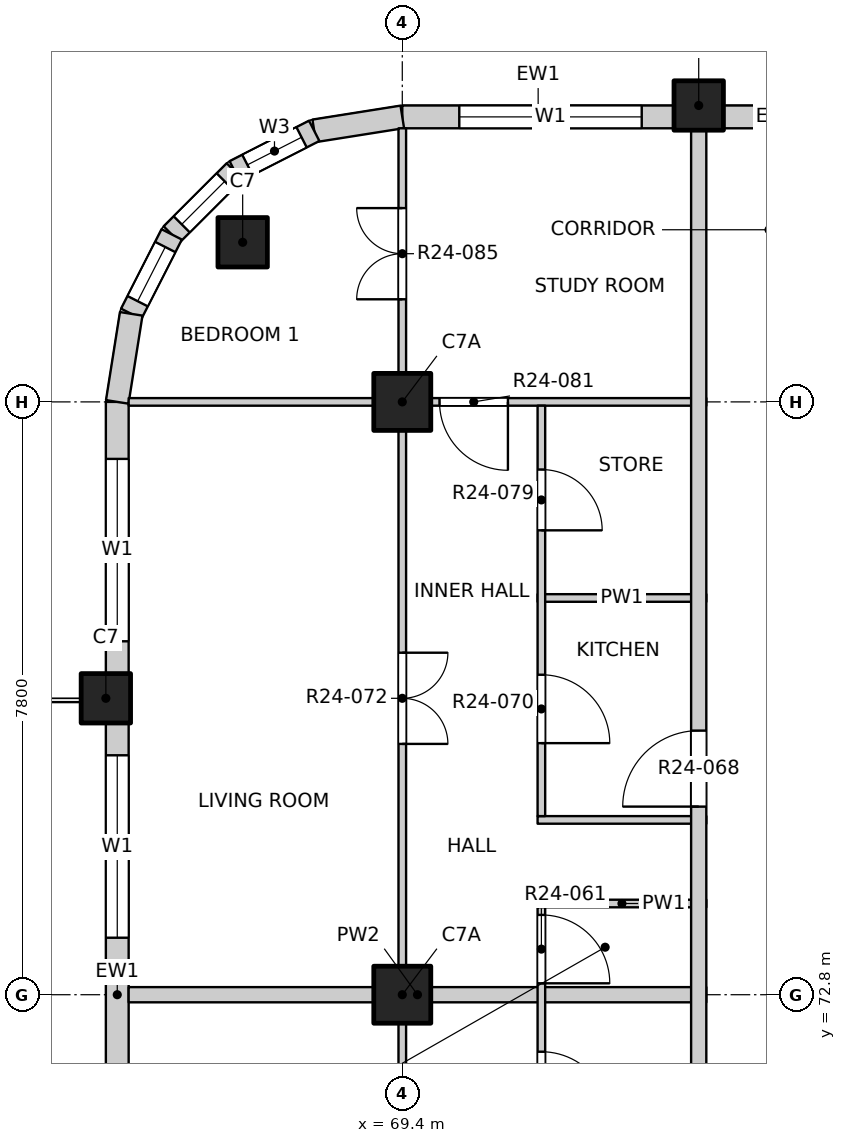
"""IFC4 building model, lengths in metres.
Left out: names, types, materials, properties, quantities, classifications, styles, units other than length and angle.
Written with IfcOpenShell. Run it as: python <this file> out.ifc"""

import sys

from ifc_helpers import new_model, si_unit, direction, frame, frame_2d, origin, origin_2d, place, context, subcontext, project, spatial, rectangle, extrude, element, fill, save


model = new_model("IFC4")
c1 = context("Model", 3, precision=1e-05, world=origin(), true_north=direction((0.0, 1.0)))
c2 = subcontext(c1, "Body", "Model", "MODEL_VIEW")
j1 = project(units=[si_unit("LENGTHUNIT", "METRE"), si_unit("PLANEANGLEUNIT", "RADIAN")], contexts=[c1])
p1 = place(None, origin())
s1 = spatial("IfcSite", under=j1, at=p1, CompositionType="ELEMENT")
p2 = place(p1, origin())
s2 = spatial("IfcBuilding", under=s1, at=p2, CompositionType="ELEMENT")
p3 = place(p2, frame((0.0, 0.0, 249.4)))
s3 = spatial("IfcBuildingStorey", under=s2, at=p3, CompositionType="ELEMENT", Elevation=249.4)
for number, where, z_axis, x_axis in (
    (1, (67.3, 82.7, -0.25), (0.0, 0.0, 1.0), (1.0, 0.0, 0.0)),
    (2, (73.3, 84.5, -0.25), (0.0, 0.0, 1.0), (1.0, 0.0, 0.0)),
    (3, (65.5, 76.7, -0.25), (0.0, 0.0, 1.0), (1.0, 0.0, 0.0)),
):
    element("IfcColumn", number, at=place(p3, frame(where, z_axis=z_axis, x_axis=x_axis)), inside=s3, PredefinedType="COLUMN", context=c2, shape_type="SweptSolid", body=[
        extrude(rectangle(XDim=0.65, YDim=0.65, at=origin_2d()), origin(), (0.0, 0.0, 1.0), 3.4),
    ])
for number, where, z_axis, x_axis in (
    (4, (69.4, 72.8, -0.25), (0.0, 0.0, 1.0), (1.0, 0.0, 0.0)),
    (5, (69.4, 80.6, -0.25), (0.0, 0.0, 1.0), (1.0, 0.0, 0.0)),
):
    element("IfcColumn", number, at=place(p3, frame(where, z_axis=z_axis, x_axis=x_axis)), inside=s3, PredefinedType="COLUMN", context=c2, shape_type="SweptSolid", body=[
        extrude(rectangle(XDim=0.75, YDim=0.75, at=origin_2d()), origin(), (0.0, 0.0, 1.0), 3.4),
    ])
p4 = place(p3, frame((69.4, 84.35, 0.0), z_axis=(0.0, 0.0, 1.0), x_axis=(1.0, 0.0, 0.0)))
e6 = element("IfcWall", 6, at=p4, inside=s3, PredefinedType="SOLIDWALL", context=c2, shape_type="SweptSolid", body=[
    extrude(rectangle(XDim=3.575, YDim=0.3, at=frame_2d((1.788, 0.0))), origin(), (0.0, 0.0, 1.0), 2.7),
])
p5 = place(p4, frame((0.75, 0.0, 0.9)))
e7 = element("IfcOpeningElement", 7, at=p5, cuts=e6, PredefinedType="OPENING", context=c2, shape_type="SweptSolid", body=[
    extrude(rectangle(XDim=2.4, YDim=1.8, at=frame_2d((1.2, 0.9))), frame((0.0, 0.16, 0.0), z_axis=(0.0, -1.0, 0.0), x_axis=(1.0, 0.0, 0.0)), (0.0, 0.0, 1.0), 0.32),
])
p6 = place(p3, frame((73.625, 84.35, 0.0), z_axis=(0.0, 0.0, 1.0), x_axis=(1.0, 0.0, 0.0)))
e8 = element("IfcWall", 8, at=p6, inside=s3, PredefinedType="SOLIDWALL", context=c2, shape_type="SweptSolid", body=[
    extrude(rectangle(XDim=1.425, YDim=0.3, at=frame_2d((0.712, 0.0))), origin(), (0.0, 0.0, 1.0), 2.7),
])
p7 = place(p3, frame((65.65, 69.225, 0.0), z_axis=(0.0, 0.0, 1.0), x_axis=(0.0, 1.0, 0.0)))
e9 = element("IfcWall", 9, at=p7, inside=s3, PredefinedType="SOLIDWALL", context=c2, shape_type="SweptSolid", body=[
    extrude(rectangle(XDim=7.15, YDim=0.3, at=frame_2d((3.575, 0.0))), origin(), (0.0, 0.0, 1.0), 2.7),
])
p8 = place(p7, frame((0.725, 0.0, 0.0)))
e10 = element("IfcOpeningElement", 10, at=p8, cuts=e9, PredefinedType="OPENING", context=c2, shape_type="SweptSolid", body=[
    extrude(rectangle(XDim=1.8, YDim=2.4, at=frame_2d((0.9, 1.2))), frame((0.0, 0.16, 0.0), z_axis=(0.0, -1.0, 0.0), x_axis=(1.0, 0.0, 0.0)), (0.0, 0.0, 1.0), 0.32),
])
p9 = place(p7, frame((4.325, 0.0, 0.9)))
e11 = element("IfcOpeningElement", 11, at=p9, cuts=e9, PredefinedType="OPENING", context=c2, shape_type="SweptSolid", body=[
    extrude(rectangle(XDim=2.4, YDim=1.8, at=frame_2d((1.2, 0.9))), frame((0.0, 0.16, 0.0), z_axis=(0.0, -1.0, 0.0), x_axis=(1.0, 0.0, 0.0)), (0.0, 0.0, 1.0), 0.32),
])
p10 = place(p3, frame((65.65, 77.025, 0.0), z_axis=(0.0, 0.0, 1.0), x_axis=(0.0, 1.0, 0.0)))
e12 = element("IfcWall", 12, at=p10, inside=s3, PredefinedType="SOLIDWALL", context=c2, shape_type="SweptSolid", body=[
    extrude(rectangle(XDim=3.575, YDim=0.3, at=frame_2d((1.788, 0.0))), origin(), (0.0, 0.0, 1.0), 2.7),
])
p11 = place(p10, frame((0.425, 0.0, 0.9)))
e13 = element("IfcOpeningElement", 13, at=p11, cuts=e12, PredefinedType="OPENING", context=c2, shape_type="SweptSolid", body=[
    extrude(rectangle(XDim=2.4, YDim=1.8, at=frame_2d((1.2, 0.9))), frame((0.0, 0.16, 0.0), z_axis=(0.0, -1.0, 0.0), x_axis=(1.0, 0.0, 0.0)), (0.0, 0.0, 1.0), 0.32),
])
p12 = place(p3, frame((69.4, 84.35, 0.0), z_axis=(0.0, 0.0, 1.0), x_axis=(-0.987678452879, -0.156496880861, 0.0)))
e14 = element("IfcWall", 14, at=p12, inside=s3, PredefinedType="SOLIDWALL", context=c2, shape_type="SweptSolid", body=[
    extrude(rectangle(XDim=1.173, YDim=0.3, at=frame_2d((0.586, 0.0))), origin(), (0.0, 0.0, 1.0), 2.7),
])
p13 = place(p3, frame((68.241, 84.167, 0.0), z_axis=(0.0, 0.0, 1.0), x_axis=(-0.890988677504, -0.454025524128, 0.0)))
e15 = element("IfcWall", 15, at=p13, inside=s3, PredefinedType="SOLIDWALL", context=c2, shape_type="SweptSolid", body=[
    extrude(rectangle(XDim=1.173, YDim=0.3, at=frame_2d((0.587, 0.0))), origin(), (0.0, 0.0, 1.0), 2.7),
])
p14 = place(p13, frame((0.187, 0.0, 0.9)))
e16 = element("IfcOpeningElement", 16, at=p14, cuts=e15, PredefinedType="OPENING", context=c2, shape_type="SweptSolid", body=[
    extrude(rectangle(XDim=0.8, YDim=1.2, at=frame_2d((0.4, 0.6))), frame((0.0, 0.16, 0.0), z_axis=(0.0, -1.0, 0.0), x_axis=(1.0, 0.0, 0.0)), (0.0, 0.0, 1.0), 0.32),
])
p15 = place(p3, frame((67.196, 83.634, 0.0), z_axis=(0.0, 0.0, 1.0), x_axis=(-0.707106781187, -0.707106781187, 0.0)))
e17 = element("IfcWall", 17, at=p15, inside=s3, PredefinedType="SOLIDWALL", context=c2, shape_type="SweptSolid", body=[
    extrude(rectangle(XDim=1.173, YDim=0.3, at=frame_2d((0.586, 0.0))), origin(), (0.0, 0.0, 1.0), 2.7),
])
p16 = place(p15, frame((0.187, 0.0, 0.9)))
e18 = element("IfcOpeningElement", 18, at=p16, cuts=e17, PredefinedType="OPENING", context=c2, shape_type="SweptSolid", body=[
    extrude(rectangle(XDim=0.8, YDim=1.2, at=frame_2d((0.4, 0.6))), frame((0.0, 0.16, 0.0), z_axis=(0.0, -1.0, 0.0), x_axis=(1.0, 0.0, 0.0)), (0.0, 0.0, 1.0), 0.32),
])
p17 = place(p3, frame((66.366, 82.804, 0.0), z_axis=(0.0, 0.0, 1.0), x_axis=(-0.454025524128, -0.890988677504, 0.0)))
e19 = element("IfcWall", 19, at=p17, inside=s3, PredefinedType="SOLIDWALL", context=c2, shape_type="SweptSolid", body=[
    extrude(rectangle(XDim=1.173, YDim=0.3, at=frame_2d((0.587, 0.0))), origin(), (0.0, 0.0, 1.0), 2.7),
])
p18 = place(p17, frame((0.187, 0.0, 0.9)))
e20 = element("IfcOpeningElement", 20, at=p18, cuts=e19, PredefinedType="OPENING", context=c2, shape_type="SweptSolid", body=[
    extrude(rectangle(XDim=0.8, YDim=1.2, at=frame_2d((0.4, 0.6))), frame((0.0, 0.16, 0.0), z_axis=(0.0, -1.0, 0.0), x_axis=(1.0, 0.0, 0.0)), (0.0, 0.0, 1.0), 0.32),
])
p19 = place(p3, frame((65.833, 81.759, 0.0), z_axis=(0.0, 0.0, 1.0), x_axis=(-0.156496880861, -0.987678452879, 0.0)))
e21 = element("IfcWall", 21, at=p19, inside=s3, PredefinedType="SOLIDWALL", context=c2, shape_type="SweptSolid", body=[
    extrude(rectangle(XDim=1.173, YDim=0.3, at=frame_2d((0.586, 0.0))), origin(), (0.0, 0.0, 1.0), 2.7),
])
p20 = place(p3, frame((65.8, 72.8, 0.0), z_axis=(0.0, 0.0, 1.0), x_axis=(1.0, 0.0, 0.0)))
e22 = element("IfcWall", 22, at=p20, inside=s3, PredefinedType="PARTITIONING", context=c2, shape_type="SweptSolid", body=[
    extrude(rectangle(XDim=7.6, YDim=0.2, at=frame_2d((3.8, 0.0))), origin(), (0.0, 0.0, 1.0), 3.15),
])
for number, where, z_axis, x_axis in (
    (23, (71.18, 74.0, 0.0), (0.0, 0.0, 1.0), (1.0, 0.0, 0.0)),
    (24, (71.18, 75.1, 0.0), (0.0, 0.0, 1.0), (1.0, 0.0, 0.0)),
    (25, (71.18, 78.02, 0.0), (0.0, 0.0, 1.0), (1.0, 0.0, 0.0)),
):
    element("IfcWall", number, at=place(p3, frame(where, z_axis=z_axis, x_axis=x_axis)), inside=s3, PredefinedType="PARTITIONING", context=c2, shape_type="SweptSolid", body=[
        extrude(rectangle(XDim=2.22, YDim=0.1, at=frame_2d((1.11, 0.0))), origin(), (0.0, 0.0, 1.0), 3.15),
    ])
p21 = place(p3, frame((65.8, 80.6, 0.0), z_axis=(0.0, 0.0, 1.0), x_axis=(1.0, 0.0, 0.0)))
e26 = element("IfcWall", 26, at=p21, inside=s3, PredefinedType="PARTITIONING", context=c2, shape_type="SweptSolid", body=[
    extrude(rectangle(XDim=7.6, YDim=0.1, at=frame_2d((3.8, 0.0))), origin(), (0.0, 0.0, 1.0), 3.15),
])
p22 = place(p21, frame((4.09, 0.0, 0.0)))
e27 = element("IfcOpeningElement", 27, at=p22, cuts=e26, PredefinedType="OPENING", context=c2, shape_type="SweptSolid", body=[
    extrude(rectangle(XDim=0.9, YDim=2.1, at=frame_2d((0.45, 1.05))), frame((0.0, 0.06, 0.0), z_axis=(0.0, -1.0, 0.0), x_axis=(1.0, 0.0, 0.0)), (0.0, 0.0, 1.0), 0.12),
])
p23 = place(p3, frame((69.4, 45.8, 0.0), z_axis=(0.0, 0.0, 1.0), x_axis=(0.0, 1.0, 0.0)))
e28 = element("IfcWall", 28, at=p23, inside=s3, PredefinedType="PARTITIONING", context=c2, shape_type="SweptSolid", body=[
    extrude(rectangle(XDim=38.4, YDim=0.1, at=frame_2d((19.2, 0.0))), origin(), (0.0, 0.0, 1.0), 3.15),
])
p24 = place(p23, frame((1.05, 0.0, 0.0)))
e29 = element("IfcOpeningElement", 29, at=p24, cuts=e28, PredefinedType="OPENING", context=c2, shape_type="SweptSolid", body=[
    extrude(rectangle(XDim=1.2, YDim=2.1, at=frame_2d((0.6, 1.05))), frame((0.0, 0.06, 0.0), z_axis=(0.0, -1.0, 0.0), x_axis=(1.0, 0.0, 0.0)), (0.0, 0.0, 1.0), 0.12),
])
p25 = place(p23, frame((5.1, 0.0, 0.0)))
e30 = element("IfcOpeningElement", 30, at=p25, cuts=e28, PredefinedType="OPENING", context=c2, shape_type="SweptSolid", body=[
    extrude(rectangle(XDim=0.9, YDim=2.1, at=frame_2d((0.45, 1.05))), frame((0.0, 0.06, 0.0), z_axis=(0.0, -1.0, 0.0), x_axis=(1.0, 0.0, 0.0)), (0.0, 0.0, 1.0), 0.12),
])
p26 = place(p23, frame((9.0, 0.0, 0.0)))
e31 = element("IfcOpeningElement", 31, at=p26, cuts=e28, PredefinedType="OPENING", context=c2, shape_type="SweptSolid", body=[
    extrude(rectangle(XDim=0.9, YDim=2.1, at=frame_2d((0.45, 1.05))), frame((0.0, 0.06, 0.0), z_axis=(0.0, -1.0, 0.0), x_axis=(1.0, 0.0, 0.0)), (0.0, 0.0, 1.0), 0.12),
])
p27 = place(p23, frame((12.9, 0.0, 0.0)))
e32 = element("IfcOpeningElement", 32, at=p27, cuts=e28, PredefinedType="OPENING", context=c2, shape_type="SweptSolid", body=[
    extrude(rectangle(XDim=0.9, YDim=2.1, at=frame_2d((0.45, 1.05))), frame((0.0, 0.06, 0.0), z_axis=(0.0, -1.0, 0.0), x_axis=(1.0, 0.0, 0.0)), (0.0, 0.0, 1.0), 0.12),
])
p28 = place(p23, frame((16.8, 0.0, 0.0)))
e33 = element("IfcOpeningElement", 33, at=p28, cuts=e28, PredefinedType="OPENING", context=c2, shape_type="SweptSolid", body=[
    extrude(rectangle(XDim=0.9, YDim=2.1, at=frame_2d((0.45, 1.05))), frame((0.0, 0.06, 0.0), z_axis=(0.0, -1.0, 0.0), x_axis=(1.0, 0.0, 0.0)), (0.0, 0.0, 1.0), 0.12),
])
p29 = place(p23, frame((20.7, 0.0, 0.0)))
e34 = element("IfcOpeningElement", 34, at=p29, cuts=e28, PredefinedType="OPENING", context=c2, shape_type="SweptSolid", body=[
    extrude(rectangle(XDim=0.9, YDim=2.1, at=frame_2d((0.45, 1.05))), frame((0.0, 0.06, 0.0), z_axis=(0.0, -1.0, 0.0), x_axis=(1.0, 0.0, 0.0)), (0.0, 0.0, 1.0), 0.12),
])
p30 = place(p23, frame((24.6, 0.0, 0.0)))
e35 = element("IfcOpeningElement", 35, at=p30, cuts=e28, PredefinedType="OPENING", context=c2, shape_type="SweptSolid", body=[
    extrude(rectangle(XDim=0.9, YDim=2.1, at=frame_2d((0.45, 1.05))), frame((0.0, 0.06, 0.0), z_axis=(0.0, -1.0, 0.0), x_axis=(1.0, 0.0, 0.0)), (0.0, 0.0, 1.0), 0.12),
])
p31 = place(p23, frame((30.3, 0.0, 0.0)))
e36 = element("IfcOpeningElement", 36, at=p31, cuts=e28, PredefinedType="OPENING", context=c2, shape_type="SweptSolid", body=[
    extrude(rectangle(XDim=1.2, YDim=2.1, at=frame_2d((0.6, 1.05))), frame((0.0, 0.06, 0.0), z_axis=(0.0, -1.0, 0.0), x_axis=(1.0, 0.0, 0.0)), (0.0, 0.0, 1.0), 0.12),
])
p32 = place(p23, frame((36.15, 0.0, 0.0)))
e37 = element("IfcOpeningElement", 37, at=p32, cuts=e28, PredefinedType="OPENING", context=c2, shape_type="SweptSolid", body=[
    extrude(rectangle(XDim=1.2, YDim=2.1, at=frame_2d((0.6, 1.05))), frame((0.0, 0.06, 0.0), z_axis=(0.0, -1.0, 0.0), x_axis=(1.0, 0.0, 0.0)), (0.0, 0.0, 1.0), 0.12),
])
p33 = place(p3, frame((71.23, 67.25, 0.0), z_axis=(0.0, 0.0, 1.0), x_axis=(0.0, 1.0, 0.0)))
e38 = element("IfcWall", 38, at=p33, inside=s3, PredefinedType="PARTITIONING", context=c2, shape_type="SweptSolid", body=[
    extrude(rectangle(XDim=6.7, YDim=0.1, at=frame_2d((3.35, 0.0))), origin(), (0.0, 0.0, 1.0), 3.15),
])
p34 = place(p33, frame((1.1, 0.0, 0.0)))
e39 = element("IfcOpeningElement", 39, at=p34, cuts=e38, PredefinedType="OPENING", context=c2, shape_type="SweptSolid", body=[
    extrude(rectangle(XDim=0.9, YDim=2.1, at=frame_2d((0.45, 1.05))), frame((0.0, 0.06, 0.0), z_axis=(0.0, -1.0, 0.0), x_axis=(1.0, 0.0, 0.0)), (0.0, 0.0, 1.0), 0.12),
])
p35 = place(p33, frame((3.9, 0.0, 0.0)))
e40 = element("IfcOpeningElement", 40, at=p35, cuts=e38, PredefinedType="OPENING", context=c2, shape_type="SweptSolid", body=[
    extrude(rectangle(XDim=0.9, YDim=2.1, at=frame_2d((0.45, 1.05))), frame((0.0, 0.06, 0.0), z_axis=(0.0, -1.0, 0.0), x_axis=(1.0, 0.0, 0.0)), (0.0, 0.0, 1.0), 0.12),
])
p36 = place(p33, frame((5.7, 0.0, 0.0)))
e41 = element("IfcOpeningElement", 41, at=p36, cuts=e38, PredefinedType="OPENING", context=c2, shape_type="SweptSolid", body=[
    extrude(rectangle(XDim=0.9, YDim=2.1, at=frame_2d((0.45, 1.05))), frame((0.0, 0.06, 0.0), z_axis=(0.0, -1.0, 0.0), x_axis=(1.0, 0.0, 0.0)), (0.0, 0.0, 1.0), 0.12),
])
p37 = place(p3, frame((71.23, 75.15, 0.0), z_axis=(0.0, 0.0, 1.0), x_axis=(0.0, 1.0, 0.0)))
e42 = element("IfcWall", 42, at=p37, inside=s3, PredefinedType="PARTITIONING", context=c2, shape_type="SweptSolid", body=[
    extrude(rectangle(XDim=5.4, YDim=0.1, at=frame_2d((2.7, 0.0))), origin(), (0.0, 0.0, 1.0), 3.15),
])
p38 = place(p37, frame((0.96, 0.0, 0.0)))
e43 = element("IfcOpeningElement", 43, at=p38, cuts=e42, PredefinedType="OPENING", context=c2, shape_type="SweptSolid", body=[
    extrude(rectangle(XDim=0.9, YDim=2.1, at=frame_2d((0.45, 1.05))), frame((0.0, 0.06, 0.0), z_axis=(0.0, -1.0, 0.0), x_axis=(1.0, 0.0, 0.0)), (0.0, 0.0, 1.0), 0.12),
])
p39 = place(p37, frame((3.76, 0.0, 0.0)))
e44 = element("IfcOpeningElement", 44, at=p39, cuts=e42, PredefinedType="OPENING", context=c2, shape_type="SweptSolid", body=[
    extrude(rectangle(XDim=0.8, YDim=2.1, at=frame_2d((0.4, 1.05))), frame((0.0, 0.06, 0.0), z_axis=(0.0, -1.0, 0.0), x_axis=(1.0, 0.0, 0.0)), (0.0, 0.0, 1.0), 0.12),
])
p40 = place(p3, frame((73.3, 49.5, 0.0), z_axis=(0.0, 0.0, 1.0), x_axis=(0.0, 1.0, 0.0)))
e45 = element("IfcWall", 45, at=p40, inside=s3, PredefinedType="PARTITIONING", context=c2, shape_type="SweptSolid", body=[
    extrude(rectangle(XDim=34.7, YDim=0.2, at=frame_2d((17.35, 0.0))), origin(), (0.0, 0.0, 1.0), 3.15),
])
p41 = place(p40, frame((3.325, 0.0, 0.0)))
e46 = element("IfcOpeningElement", 46, at=p41, cuts=e45, PredefinedType="OPENING", context=c2, shape_type="SweptSolid", body=[
    extrude(rectangle(XDim=1.0, YDim=2.1, at=frame_2d((0.5, 1.05))), frame((0.0, 0.11, 0.0), z_axis=(0.0, -1.0, 0.0), x_axis=(1.0, 0.0, 0.0)), (0.0, 0.0, 1.0), 0.22),
])
p42 = place(p40, frame((17.875, 0.0, 0.0)))
e47 = element("IfcOpeningElement", 47, at=p42, cuts=e45, PredefinedType="OPENING", context=c2, shape_type="SweptSolid", body=[
    extrude(rectangle(XDim=1.0, YDim=2.1, at=frame_2d((0.5, 1.05))), frame((0.0, 0.11, 0.0), z_axis=(0.0, -1.0, 0.0), x_axis=(1.0, 0.0, 0.0)), (0.0, 0.0, 1.0), 0.22),
])
p43 = place(p40, frame((25.775, 0.0, 0.0)))
e48 = element("IfcOpeningElement", 48, at=p43, cuts=e45, PredefinedType="OPENING", context=c2, shape_type="SweptSolid", body=[
    extrude(rectangle(XDim=1.0, YDim=2.1, at=frame_2d((0.5, 1.05))), frame((0.0, 0.11, 0.0), z_axis=(0.0, -1.0, 0.0), x_axis=(1.0, 0.0, 0.0)), (0.0, 0.0, 1.0), 0.22),
])
p44 = place(p5, origin())
e49 = element("IfcWindow", 49, at=p44, inside=s3, PartitioningType="DOUBLE_PANEL_VERTICAL", PredefinedType="WINDOW", context=c2, shape_type="SweptSolid", body=[
    extrude(rectangle(XDim=2.4, YDim=1.8, at=frame_2d((1.2, 0.9))), frame((0.0, 0.03, 0.0), z_axis=(0.0, -1.0, 0.0), x_axis=(1.0, 0.0, 0.0)), (0.0, 0.0, 1.0), 0.06),
])
fill(e7, e49)
p45 = place(p9, origin())
e50 = element("IfcWindow", 50, at=p45, inside=s3, PartitioningType="DOUBLE_PANEL_VERTICAL", PredefinedType="WINDOW", context=c2, shape_type="SweptSolid", body=[
    extrude(rectangle(XDim=2.4, YDim=1.8, at=frame_2d((1.2, 0.9))), frame((0.0, 0.03, 0.0), z_axis=(0.0, -1.0, 0.0), x_axis=(1.0, 0.0, 0.0)), (0.0, 0.0, 1.0), 0.06),
])
fill(e11, e50)
p46 = place(p11, origin())
e51 = element("IfcWindow", 51, at=p46, inside=s3, PartitioningType="DOUBLE_PANEL_VERTICAL", PredefinedType="WINDOW", context=c2, shape_type="SweptSolid", body=[
    extrude(rectangle(XDim=2.4, YDim=1.8, at=frame_2d((1.2, 0.9))), frame((0.0, 0.03, 0.0), z_axis=(0.0, -1.0, 0.0), x_axis=(1.0, 0.0, 0.0)), (0.0, 0.0, 1.0), 0.06),
])
fill(e13, e51)
p47 = place(p14, origin())
e52 = element("IfcWindow", 52, at=p47, inside=s3, PartitioningType="SINGLE_PANEL", PredefinedType="WINDOW", context=c2, shape_type="SweptSolid", body=[
    extrude(rectangle(XDim=0.8, YDim=1.2, at=frame_2d((0.4, 0.6))), frame((0.0, 0.03, 0.0), z_axis=(0.0, -1.0, 0.0), x_axis=(1.0, 0.0, 0.0)), (0.0, 0.0, 1.0), 0.06),
])
fill(e16, e52)
p48 = place(p16, origin())
e53 = element("IfcWindow", 53, at=p48, inside=s3, PartitioningType="SINGLE_PANEL", PredefinedType="WINDOW", context=c2, shape_type="SweptSolid", body=[
    extrude(rectangle(XDim=0.8, YDim=1.2, at=frame_2d((0.4, 0.6))), frame((0.0, 0.03, 0.0), z_axis=(0.0, -1.0, 0.0), x_axis=(1.0, 0.0, 0.0)), (0.0, 0.0, 1.0), 0.06),
])
fill(e18, e53)
p49 = place(p18, origin())
e54 = element("IfcWindow", 54, at=p49, inside=s3, PartitioningType="SINGLE_PANEL", PredefinedType="WINDOW", context=c2, shape_type="SweptSolid", body=[
    extrude(rectangle(XDim=0.8, YDim=1.2, at=frame_2d((0.4, 0.6))), frame((0.0, 0.03, 0.0), z_axis=(0.0, -1.0, 0.0), x_axis=(1.0, 0.0, 0.0)), (0.0, 0.0, 1.0), 0.06),
])
fill(e20, e54)
p50 = place(p35, origin())
e55 = element("IfcDoor", 55, at=p50, inside=s3, OperationType="SINGLE_SWING_RIGHT", PredefinedType="DOOR", context=c2, shape_type="SweptSolid", body=[
    extrude(rectangle(XDim=0.9, YDim=2.1, at=frame_2d((0.45, 1.05))), frame((0.0, 0.025, 0.0), z_axis=(0.0, -1.0, 0.0), x_axis=(1.0, 0.0, 0.0)), (0.0, 0.0, 1.0), 0.05),
])
fill(e40, e55)
p51 = place(p36, origin())
e56 = element("IfcDoor", 56, at=p51, inside=s3, OperationType="SINGLE_SWING_RIGHT", PredefinedType="DOOR", context=c2, shape_type="SweptSolid", body=[
    extrude(rectangle(XDim=0.9, YDim=2.1, at=frame_2d((0.45, 1.05))), frame((0.0, 0.025, 0.0), z_axis=(0.0, -1.0, 0.0), x_axis=(1.0, 0.0, 0.0)), (0.0, 0.0, 1.0), 0.05),
])
fill(e41, e56)
p52 = place(p43, origin())
e57 = element("IfcDoor", 57, at=p52, inside=s3, OperationType="SINGLE_SWING_RIGHT", PredefinedType="DOOR", context=c2, shape_type="SweptSolid", body=[
    extrude(rectangle(XDim=1.0, YDim=2.1, at=frame_2d((0.5, 1.05))), frame((0.0, 0.025, 0.0), z_axis=(0.0, -1.0, 0.0), x_axis=(1.0, 0.0, 0.0)), (0.0, 0.0, 1.0), 0.05),
])
fill(e48, e57)
p53 = place(p38, origin())
e58 = element("IfcDoor", 58, at=p53, inside=s3, OperationType="SINGLE_SWING_RIGHT", PredefinedType="DOOR", context=c2, shape_type="SweptSolid", body=[
    extrude(rectangle(XDim=0.9, YDim=2.1, at=frame_2d((0.45, 1.05))), frame((0.0, 0.025, 0.0), z_axis=(0.0, -1.0, 0.0), x_axis=(1.0, 0.0, 0.0)), (0.0, 0.0, 1.0), 0.05),
])
fill(e43, e58)
p54 = place(p31, origin())
e59 = element("IfcDoor", 59, at=p54, inside=s3, OperationType="DOUBLE_DOOR_SINGLE_SWING", PredefinedType="DOOR", context=c2, shape_type="SweptSolid", body=[
    extrude(rectangle(XDim=1.2, YDim=2.1, at=frame_2d((0.6, 1.05))), frame((0.0, 0.025, 0.0), z_axis=(0.0, -1.0, 0.0), x_axis=(1.0, 0.0, 0.0)), (0.0, 0.0, 1.0), 0.05),
])
fill(e36, e59)
p55 = place(p39, origin())
e60 = element("IfcDoor", 60, at=p55, inside=s3, OperationType="SINGLE_SWING_RIGHT", PredefinedType="DOOR", context=c2, shape_type="SweptSolid", body=[
    extrude(rectangle(XDim=0.8, YDim=2.1, at=frame_2d((0.4, 1.05))), frame((0.0, 0.025, 0.0), z_axis=(0.0, -1.0, 0.0), x_axis=(1.0, 0.0, 0.0)), (0.0, 0.0, 1.0), 0.05),
])
fill(e44, e60)
p56 = place(p22, origin())
e61 = element("IfcDoor", 61, at=p56, inside=s3, OperationType="SINGLE_SWING_LEFT", PredefinedType="DOOR", context=c2, shape_type="SweptSolid", body=[
    extrude(rectangle(XDim=0.9, YDim=2.1, at=frame_2d((0.45, 1.05))), frame((0.0, 0.025, 0.0), z_axis=(0.0, -1.0, 0.0), x_axis=(1.0, 0.0, 0.0)), (0.0, 0.0, 1.0), 0.05),
])
fill(e27, e61)
p57 = place(p32, origin())
e62 = element("IfcDoor", 62, at=p57, inside=s3, OperationType="DOUBLE_DOOR_SINGLE_SWING", PredefinedType="DOOR", context=c2, shape_type="SweptSolid", body=[
    extrude(rectangle(XDim=1.2, YDim=2.1, at=frame_2d((0.6, 1.05))), frame((0.0, 0.025, 0.0), z_axis=(0.0, -1.0, 0.0), x_axis=(1.0, 0.0, 0.0)), (0.0, 0.0, 1.0), 0.05),
])
fill(e37, e62)
save(model, sys.argv[1])
